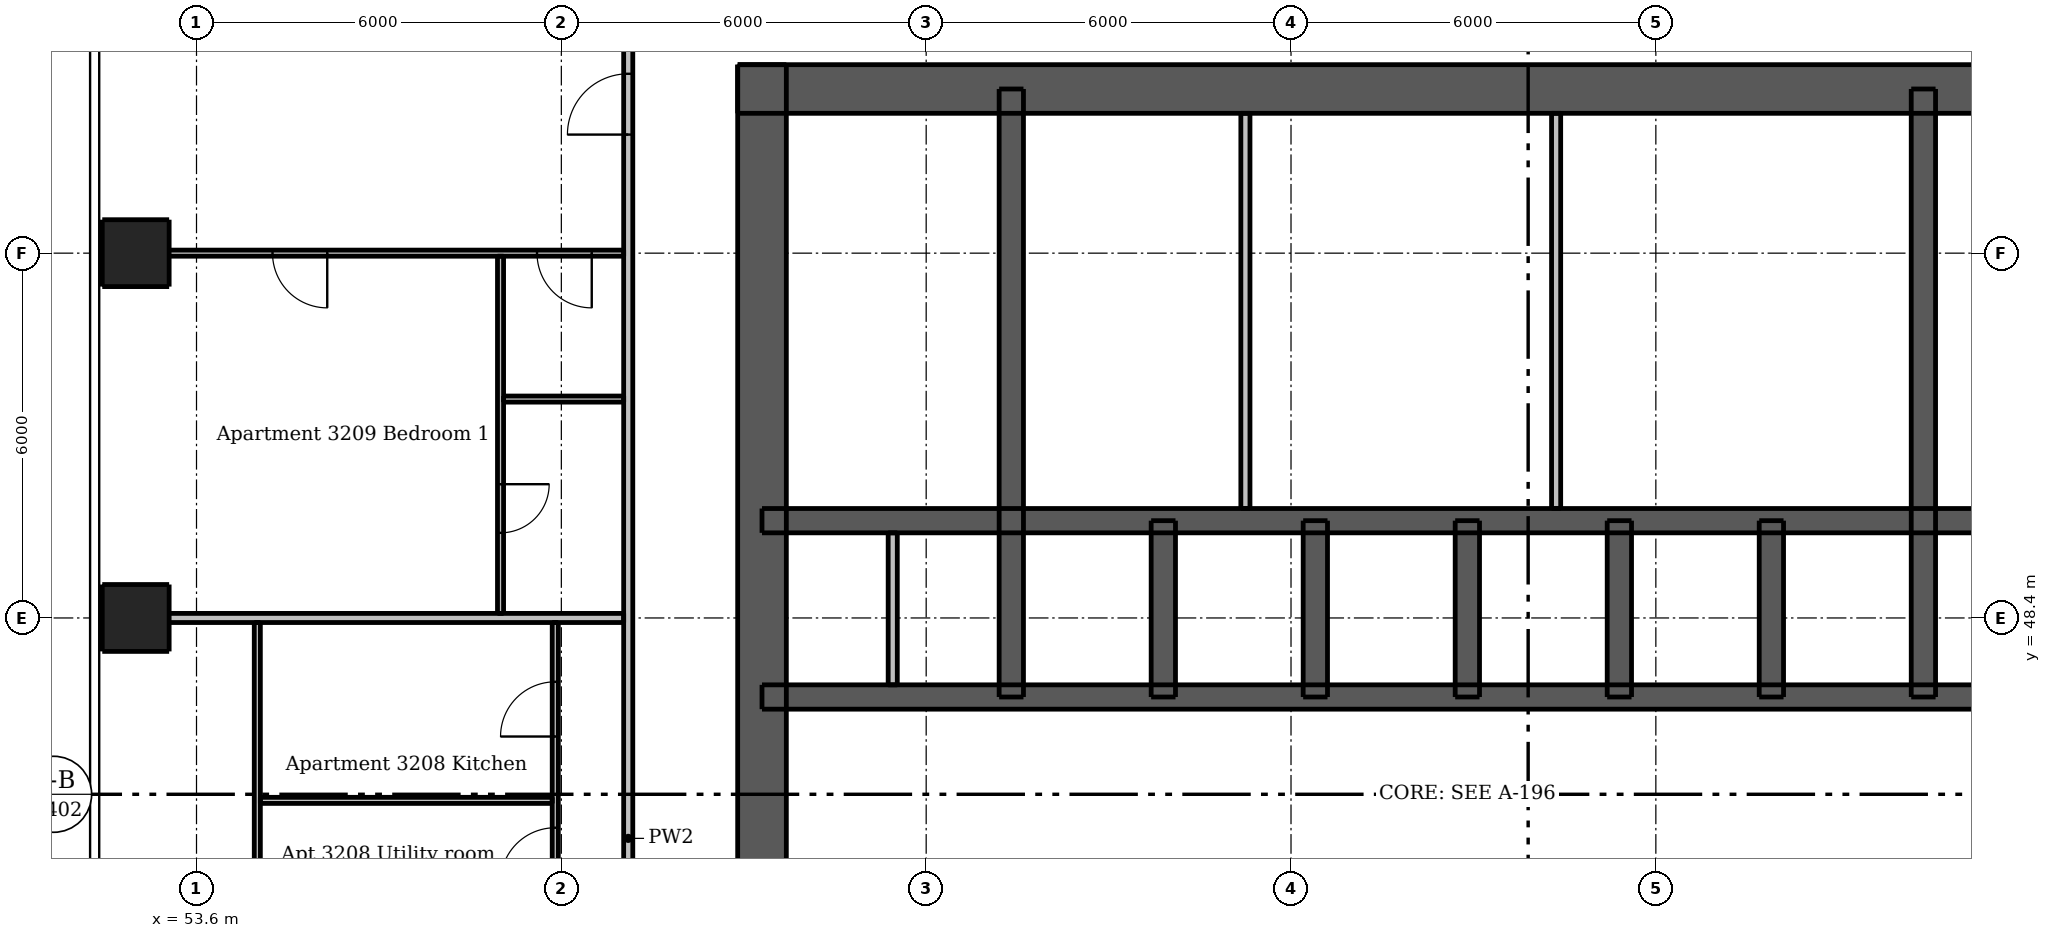
"""IFC4 building model, lengths in metres.
Left out: names, types, materials, properties, quantities, classifications, styles, units other than length and angle.
Written with IfcOpenShell. Run it as: python <this file> out.ifc"""

import sys

from ifc_helpers import new_model, si_unit, direction, frame, frame_2d, origin, origin_2d, place, context, subcontext, project, spatial, rectangle, extrude, element, fill, save


model = new_model("IFC4")
c1 = context("Model", 3, precision=1e-05, world=origin(), true_north=direction((0.0, 1.0)))
c2 = subcontext(c1, "Body", "Model", "MODEL_VIEW")
j1 = project(units=[si_unit("LENGTHUNIT", "METRE"), si_unit("PLANEANGLEUNIT", "RADIAN")], contexts=[c1])
p1 = place(None, origin())
s1 = spatial("IfcSite", under=j1, at=p1, CompositionType="ELEMENT")
p2 = place(p1, origin())
s2 = spatial("IfcBuilding", under=s1, at=p2, CompositionType="ELEMENT")
p3 = place(p2, frame((0.0, 0.0, 118.3)))
s3 = spatial("IfcBuildingStorey", under=s2, at=p3, CompositionType="ELEMENT", Elevation=118.3)
p4 = place(p3, frame((62.5, 57.1, 0.0), z_axis=(0.0, 0.0, 1.0), x_axis=(1.0, 0.0, 0.0)))
e1 = element("IfcWall", 1, at=p4, inside=s3, PredefinedType="SHEAR", context=c2, shape_type="SweptSolid", body=[
    extrude(rectangle(XDim=24.0, YDim=0.8, at=frame_2d((12.0, 0.0))), origin(), (0.0, 0.0, 1.0), 3.05),
])
p5 = place(p4, frame((20.9, 0.0, 0.0)))
e2 = element("IfcOpeningElement", 2, at=p5, cuts=e1, PredefinedType="OPENING", context=c2, shape_type="SweptSolid", body=[
    extrude(rectangle(XDim=1.1, YDim=2.1, at=frame_2d((0.55, 1.05))), frame((0.0, 0.41, 0.0), z_axis=(0.0, -1.0, 0.0), x_axis=(1.0, 0.0, 0.0)), (0.0, 0.0, 1.0), 0.82),
])
p6 = place(p4, frame((2.0, 0.0, 0.0)))
e3 = element("IfcOpeningElement", 3, at=p6, cuts=e1, PredefinedType="OPENING", context=c2, shape_type="SweptSolid", body=[
    extrude(rectangle(XDim=1.1, YDim=2.1, at=frame_2d((0.55, 1.05))), frame((0.0, 0.41, 0.0), z_axis=(0.0, -1.0, 0.0), x_axis=(1.0, 0.0, 0.0)), (0.0, 0.0, 1.0), 0.82),
])
p7 = place(p4, frame((6.075, 0.0, 0.0)))
e4 = element("IfcOpeningElement", 4, at=p7, cuts=e1, PredefinedType="OPENING", context=c2, shape_type="SweptSolid", body=[
    extrude(rectangle(XDim=0.9, YDim=2.1, at=frame_2d((0.45, 1.05))), frame((0.0, 0.41, 0.0), z_axis=(0.0, -1.0, 0.0), x_axis=(1.0, 0.0, 0.0)), (0.0, 0.0, 1.0), 0.82),
])
p8 = place(p4, frame((10.455, 0.0, 0.0)))
e5 = element("IfcOpeningElement", 5, at=p8, cuts=e1, PredefinedType="OPENING", context=c2, shape_type="SweptSolid", body=[
    extrude(rectangle(XDim=0.9, YDim=2.1, at=frame_2d((0.45, 1.05))), frame((0.0, 0.41, 0.0), z_axis=(0.0, -1.0, 0.0), x_axis=(1.0, 0.0, 0.0)), (0.0, 0.0, 1.0), 0.82),
])
p9 = place(p4, frame((15.93, 0.0, 0.0)))
e6 = element("IfcOpeningElement", 6, at=p9, cuts=e1, PredefinedType="OPENING", context=c2, shape_type="SweptSolid", body=[
    extrude(rectangle(XDim=0.9, YDim=2.1, at=frame_2d((0.45, 1.05))), frame((0.0, 0.41, 0.0), z_axis=(0.0, -1.0, 0.0), x_axis=(1.0, 0.0, 0.0)), (0.0, 0.0, 1.0), 0.82),
])
p10 = place(p3, frame((62.9, 33.5, 0.0), z_axis=(0.0, 0.0, 1.0), x_axis=(0.0, 1.0, 0.0)))
e7 = element("IfcWall", 7, at=p10, inside=s3, PredefinedType="SHEAR", context=c2, shape_type="SweptSolid", body=[
    extrude(rectangle(XDim=24.0, YDim=0.8, at=frame_2d((12.0, 0.0))), origin(), (0.0, 0.0, 1.0), 3.05),
])
p11 = place(p10, frame((11.2, 0.0, 0.0)))
e8 = element("IfcOpeningElement", 8, at=p11, cuts=e7, PredefinedType="OPENING", context=c2, shape_type="SweptSolid", body=[
    extrude(rectangle(XDim=1.6, YDim=2.1, at=frame_2d((0.8, 1.05))), frame((0.0, 0.41, 0.0), z_axis=(0.0, -1.0, 0.0), x_axis=(1.0, 0.0, 0.0)), (0.0, 0.0, 1.0), 0.82),
])
p12 = place(p3, frame((62.9, 47.1, 0.0), z_axis=(0.0, 0.0, 1.0), x_axis=(1.0, 0.0, 0.0)))
e9 = element("IfcWall", 9, at=p12, inside=s3, PredefinedType="SHEAR", context=c2, shape_type="SweptSolid", body=[
    extrude(rectangle(XDim=23.2, YDim=0.4, at=frame_2d((11.6, 0.0))), origin(), (0.0, 0.0, 1.0), 3.05),
])
p13 = place(p12, frame((0.825, 0.0, 0.0)))
e10 = element("IfcOpeningElement", 10, at=p13, cuts=e9, PredefinedType="OPENING", context=c2, shape_type="SweptSolid", body=[
    extrude(rectangle(XDim=0.9, YDim=2.1, at=frame_2d((0.45, 1.05))), frame((0.0, 0.21, 0.0), z_axis=(0.0, -1.0, 0.0), x_axis=(1.0, 0.0, 0.0)), (0.0, 0.0, 1.0), 0.42),
])
p14 = place(p12, frame((2.575, 0.0, 0.0)))
e11 = element("IfcOpeningElement", 11, at=p14, cuts=e9, PredefinedType="OPENING", context=c2, shape_type="SweptSolid", body=[
    extrude(rectangle(XDim=0.9, YDim=2.1, at=frame_2d((0.45, 1.05))), frame((0.0, 0.21, 0.0), z_axis=(0.0, -1.0, 0.0), x_axis=(1.0, 0.0, 0.0)), (0.0, 0.0, 1.0), 0.42),
])
p15 = place(p12, frame((20.6, 0.0, 0.0)))
e12 = element("IfcOpeningElement", 12, at=p15, cuts=e9, PredefinedType="OPENING", context=c2, shape_type="SweptSolid", body=[
    extrude(rectangle(XDim=0.9, YDim=2.1, at=frame_2d((0.45, 1.05))), frame((0.0, 0.21, 0.0), z_axis=(0.0, -1.0, 0.0), x_axis=(1.0, 0.0, 0.0)), (0.0, 0.0, 1.0), 0.42),
])
p16 = place(p3, frame((62.9, 50.0, 0.0), z_axis=(0.0, 0.0, 1.0), x_axis=(1.0, 0.0, 0.0)))
e13 = element("IfcWall", 13, at=p16, inside=s3, PredefinedType="SHEAR", context=c2, shape_type="SweptSolid", body=[
    extrude(rectangle(XDim=23.2, YDim=0.4, at=frame_2d((11.6, 0.0))), origin(), (0.0, 0.0, 1.0), 3.05),
])
for number, where, z_axis, x_axis in (
    (14, (67.0, 47.1, 0.0), (0.0, 0.0, 1.0), (0.0, 1.0, 0.0)),
    (15, (82.0, 47.1, 0.0), (0.0, 0.0, 1.0), (0.0, 1.0, 0.0)),
):
    element("IfcWall", number, at=place(p3, frame(where, z_axis=z_axis, x_axis=x_axis)), inside=s3, PredefinedType="SHEAR", context=c2, shape_type="SweptSolid", body=[
        extrude(rectangle(XDim=10.0, YDim=0.4, at=frame_2d((5.0, 0.0))), origin(), (0.0, 0.0, 1.0), 3.05),
    ])
for number, where, z_axis, x_axis in (
    (16, (69.5, 47.1, 0.0), (0.0, 0.0, 1.0), (0.0, 1.0, 0.0)),
    (17, (72.0, 47.1, 0.0), (0.0, 0.0, 1.0), (0.0, 1.0, 0.0)),
    (18, (74.5, 47.1, 0.0), (0.0, 0.0, 1.0), (0.0, 1.0, 0.0)),
    (19, (77.0, 47.1, 0.0), (0.0, 0.0, 1.0), (0.0, 1.0, 0.0)),
    (20, (79.5, 47.1, 0.0), (0.0, 0.0, 1.0), (0.0, 1.0, 0.0)),
):
    element("IfcWall", number, at=place(p3, frame(where, z_axis=z_axis, x_axis=x_axis)), inside=s3, PredefinedType="SHEAR", context=c2, shape_type="SweptSolid", body=[
        extrude(rectangle(XDim=2.9, YDim=0.4, at=frame_2d((1.45, 0.0))), origin(), (0.0, 0.0, 1.0), 3.05),
    ])
for number, where, z_axis, x_axis in (
    (21, (52.6, 48.4, 0.0), (0.0, 0.0, 1.0), (1.0, 0.0, 0.0)),
    (22, (52.6, 54.4, 0.0), (0.0, 0.0, 1.0), (1.0, 0.0, 0.0)),
):
    element("IfcColumn", number, at=place(p3, frame(where, z_axis=z_axis, x_axis=x_axis)), inside=s3, PredefinedType="COLUMN", context=c2, shape_type="SweptSolid", body=[
        extrude(rectangle(XDim=1.1, YDim=1.1, at=origin_2d()), origin(), (0.0, 0.0, 1.0), 3.05),
    ])
p17 = place(p3, frame((65.05, 47.3, 0.0), z_axis=(0.0, 0.0, 1.0), x_axis=(0.0, 1.0, 0.0)))
e23 = element("IfcWall", 23, at=p17, inside=s3, PredefinedType="PLUMBINGWALL", context=c2, shape_type="SweptSolid", body=[
    extrude(rectangle(XDim=2.5, YDim=0.15, at=frame_2d((1.25, 0.0))), origin(), (0.0, 0.0, 1.0), 3.05),
])
for number, where, z_axis, x_axis in (
    (24, (70.85, 50.2, 0.0), (0.0, 0.0, 1.0), (0.0, 1.0, 0.0)),
    (25, (75.96, 50.2, 0.0), (0.0, 0.0, 1.0), (0.0, 1.0, 0.0)),
):
    element("IfcWall", number, at=place(p3, frame(where, z_axis=z_axis, x_axis=x_axis)), inside=s3, PredefinedType="PLUMBINGWALL", context=c2, shape_type="SweptSolid", body=[
        extrude(rectangle(XDim=6.5, YDim=0.15, at=frame_2d((3.25, 0.0))), origin(), (0.0, 0.0, 1.0), 3.05),
    ])
p18 = place(p3, frame((54.6, 43.55, 0.0), z_axis=(0.0, 0.0, 1.0), x_axis=(0.0, 1.0, 0.0)))
e26 = element("IfcWall", 26, at=p18, inside=s3, PredefinedType="PARTITIONING", context=c2, shape_type="SweptSolid", body=[
    extrude(rectangle(XDim=4.775, YDim=0.1, at=frame_2d((2.387, 0.0))), origin(), (0.0, 0.0, 1.0), 3.05),
])
p19 = place(p3, frame((58.6, 54.35, 0.0), z_axis=(0.0, 0.0, 1.0), x_axis=(0.0, -1.0, 0.0)))
e27 = element("IfcWall", 27, at=p19, inside=s3, PredefinedType="PARTITIONING", context=c2, shape_type="SweptSolid", body=[
    extrude(rectangle(XDim=5.875, YDim=0.1, at=frame_2d((2.938, 0.0))), origin(), (0.0, 0.0, 1.0), 3.05),
])
p20 = place(p19, frame((3.75, 0.0, 0.0)))
e28 = element("IfcOpeningElement", 28, at=p20, cuts=e27, PredefinedType="OPENING", context=c2, shape_type="SweptSolid", body=[
    extrude(rectangle(XDim=0.8, YDim=2.1, at=frame_2d((0.4, 1.05))), frame((0.0, 0.06, 0.0), z_axis=(0.0, -1.0, 0.0), x_axis=(1.0, 0.0, 0.0)), (0.0, 0.0, 1.0), 0.12),
])
p21 = place(p3, frame((59.5, 31.65, 0.0), z_axis=(0.0, 0.0, 1.0), x_axis=(0.0, 1.0, 0.0)))
e29 = element("IfcWall", 29, at=p21, inside=s3, PredefinedType="PARTITIONING", context=c2, shape_type="SweptSolid", body=[
    extrude(rectangle(XDim=16.675, YDim=0.1, at=frame_2d((8.337, 0.0))), origin(), (0.0, 0.0, 1.0), 2.51),
])
p22 = place(p21, frame((9.7, 0.0, 0.0)))
e30 = element("IfcOpeningElement", 30, at=p22, cuts=e29, PredefinedType="OPENING", context=c2, shape_type="SweptSolid", body=[
    extrude(rectangle(XDim=0.9, YDim=2.1, at=frame_2d((0.45, 1.05))), frame((0.0, 0.06, 0.0), z_axis=(0.0, -1.0, 0.0), x_axis=(1.0, 0.0, 0.0)), (0.0, 0.0, 1.0), 0.12),
])
p23 = place(p21, frame((14.8, 0.0, 0.0)))
e31 = element("IfcOpeningElement", 31, at=p23, cuts=e29, PredefinedType="OPENING", context=c2, shape_type="SweptSolid", body=[
    extrude(rectangle(XDim=0.9, YDim=2.1, at=frame_2d((0.45, 1.05))), frame((0.0, 0.06, 0.0), z_axis=(0.0, -1.0, 0.0), x_axis=(1.0, 0.0, 0.0)), (0.0, 0.0, 1.0), 0.12),
])
p24 = place(p21, frame((12.4, 0.0, 0.0)))
e32 = element("IfcOpeningElement", 32, at=p24, cuts=e29, PredefinedType="OPENING", context=c2, shape_type="SweptSolid", body=[
    extrude(rectangle(XDim=0.9, YDim=2.1, at=frame_2d((0.45, 1.05))), frame((0.0, 0.06, 0.0), z_axis=(0.0, -1.0, 0.0), x_axis=(1.0, 0.0, 0.0)), (0.0, 0.0, 1.0), 0.12),
])
p25 = place(p21, frame((5.2, 0.0, 0.0)))
e33 = element("IfcOpeningElement", 33, at=p25, cuts=e29, PredefinedType="OPENING", context=c2, shape_type="SweptSolid", body=[
    extrude(rectangle(XDim=0.9, YDim=2.1, at=frame_2d((0.45, 1.05))), frame((0.0, 0.06, 0.0), z_axis=(0.0, -1.0, 0.0), x_axis=(1.0, 0.0, 0.0)), (0.0, 0.0, 1.0), 0.12),
])
p26 = place(p21, frame((7.05, 0.0, 0.0)))
e34 = element("IfcOpeningElement", 34, at=p26, cuts=e29, PredefinedType="OPENING", context=c2, shape_type="SweptSolid", body=[
    extrude(rectangle(XDim=0.8, YDim=2.1, at=frame_2d((0.4, 1.05))), frame((0.0, 0.06, 0.0), z_axis=(0.0, -1.0, 0.0), x_axis=(1.0, 0.0, 0.0)), (0.0, 0.0, 1.0), 0.12),
])
p27 = place(p21, frame((0.75, 0.0, 0.0)))
e35 = element("IfcOpeningElement", 35, at=p27, cuts=e29, PredefinedType="OPENING", context=c2, shape_type="SweptSolid", body=[
    extrude(rectangle(XDim=0.9, YDim=2.1, at=frame_2d((0.45, 1.05))), frame((0.0, 0.06, 0.0), z_axis=(0.0, -1.0, 0.0), x_axis=(1.0, 0.0, 0.0)), (0.0, 0.0, 1.0), 0.12),
])
p28 = place(p21, frame((3.15, 0.0, 0.0)))
e36 = element("IfcOpeningElement", 36, at=p28, cuts=e29, PredefinedType="OPENING", context=c2, shape_type="SweptSolid", body=[
    extrude(rectangle(XDim=0.8, YDim=2.1, at=frame_2d((0.4, 1.05))), frame((0.0, 0.06, 0.0), z_axis=(0.0, -1.0, 0.0), x_axis=(1.0, 0.0, 0.0)), (0.0, 0.0, 1.0), 0.12),
])
p29 = place(p3, frame((60.625, 54.4, 0.0), z_axis=(0.0, 0.0, 1.0), x_axis=(-1.0, 0.0, 0.0)))
e37 = element("IfcWall", 37, at=p29, inside=s3, PredefinedType="PARTITIONING", context=c2, shape_type="SweptSolid", body=[
    extrude(rectangle(XDim=8.625, YDim=0.1, at=frame_2d((4.312, 0.0))), origin(), (0.0, 0.0, 1.0), 2.516),
])
p30 = place(p29, frame((0.525, 0.0, 0.0)))
e38 = element("IfcOpeningElement", 38, at=p30, cuts=e37, PredefinedType="OPENING", context=c2, shape_type="SweptSolid", body=[
    extrude(rectangle(XDim=0.9, YDim=2.1, at=frame_2d((0.45, 1.05))), frame((0.0, 0.06, 0.0), z_axis=(0.0, -1.0, 0.0), x_axis=(1.0, 0.0, 0.0)), (0.0, 0.0, 1.0), 0.12),
])
p31 = place(p29, frame((4.875, 0.0, 0.0)))
e39 = element("IfcOpeningElement", 39, at=p31, cuts=e37, PredefinedType="OPENING", context=c2, shape_type="SweptSolid", body=[
    extrude(rectangle(XDim=0.9, YDim=2.1, at=frame_2d((0.45, 1.05))), frame((0.0, 0.06, 0.0), z_axis=(0.0, -1.0, 0.0), x_axis=(1.0, 0.0, 0.0)), (0.0, 0.0, 1.0), 0.12),
])
p32 = place(p3, frame((58.65, 52.0, 0.0), z_axis=(0.0, 0.0, 1.0), x_axis=(1.0, 0.0, 0.0)))
e40 = element("IfcWall", 40, at=p32, inside=s3, PredefinedType="PARTITIONING", context=c2, shape_type="SweptSolid", body=[
    extrude(rectangle(XDim=1.975, YDim=0.1, at=frame_2d((0.988, 0.0))), origin(), (0.0, 0.0, 1.0), 3.05),
])
p33 = place(p3, frame((54.65, 45.4, 0.0), z_axis=(0.0, 0.0, 1.0), x_axis=(1.0, 0.0, 0.0)))
e41 = element("IfcWall", 41, at=p33, inside=s3, PredefinedType="PARTITIONING", context=c2, shape_type="SweptSolid", body=[
    extrude(rectangle(XDim=4.8, YDim=0.1, at=frame_2d((2.4, 0.0))), origin(), (0.0, 0.0, 1.0), 3.05),
])
p34 = place(p3, frame((60.7, 30.325, 0.0), z_axis=(0.0, 0.0, 1.0), x_axis=(0.0, 1.0, 0.0)))
e42 = element("IfcWall", 42, at=p34, inside=s3, PredefinedType="PARTITIONING", context=c2, shape_type="SweptSolid", body=[
    extrude(rectangle(XDim=28.9, YDim=0.15, at=frame_2d((14.45, 0.0))), origin(), (0.0, 0.0, 1.0), 3.05),
])
p35 = place(p34, frame((9.225, 0.0, 0.0)))
e43 = element("IfcOpeningElement", 43, at=p35, cuts=e42, PredefinedType="OPENING", context=c2, shape_type="SweptSolid", body=[
    extrude(rectangle(XDim=1.0, YDim=2.1, at=frame_2d((0.5, 1.05))), frame((0.0, 0.085, 0.0), z_axis=(0.0, -1.0, 0.0), x_axis=(1.0, 0.0, 0.0)), (0.0, 0.0, 1.0), 0.17),
])
p36 = place(p34, frame((26.025, 0.0, 0.0)))
e44 = element("IfcOpeningElement", 44, at=p36, cuts=e42, PredefinedType="OPENING", context=c2, shape_type="SweptSolid", body=[
    extrude(rectangle(XDim=1.0, YDim=2.1, at=frame_2d((0.5, 1.05))), frame((0.0, 0.085, 0.0), z_axis=(0.0, -1.0, 0.0), x_axis=(1.0, 0.0, 0.0)), (0.0, 0.0, 1.0), 0.17),
])
p37 = place(p3, frame((52.0, 48.4, 0.0), z_axis=(0.0, 0.0, 1.0), x_axis=(1.0, 0.0, 0.0)))
e45 = element("IfcWall", 45, at=p37, inside=s3, PredefinedType="PARTITIONING", context=c2, shape_type="SweptSolid", body=[
    extrude(rectangle(XDim=8.625, YDim=0.15, at=frame_2d((4.312, 0.0))), origin(), (0.0, 0.0, 1.0), 2.516),
])
p38 = place(p6, origin())
e46 = element("IfcDoor", 46, at=p38, inside=s3, OperationType="SINGLE_SWING_LEFT", PredefinedType="DOOR", context=c2, shape_type="SweptSolid", body=[
    extrude(rectangle(XDim=1.1, YDim=2.1, at=frame_2d((0.55, 1.05))), frame((0.0, -0.337, 0.0), z_axis=(0.0, -1.0, 0.0), x_axis=(1.0, 0.0, 0.0)), (0.0, 0.0, 1.0), 0.05),
])
fill(e3, e46)
p39 = place(p11, origin())
e47 = element("IfcDoor", 47, at=p39, inside=s3, OperationType="DOUBLE_DOOR_SINGLE_SWING", PredefinedType="DOOR", context=c2, shape_type="SweptSolid", body=[
    extrude(rectangle(XDim=1.6, YDim=2.1, at=frame_2d((0.8, 1.05))), frame((0.0, -0.337, 0.0), z_axis=(0.0, -1.0, 0.0), x_axis=(1.0, 0.0, 0.0)), (0.0, 0.0, 1.0), 0.05),
])
fill(e8, e47)
p40 = place(p13, origin())
e48 = element("IfcDoor", 48, at=p40, inside=s3, OperationType="SINGLE_SWING_LEFT", PredefinedType="DOOR", context=c2, shape_type="SweptSolid", body=[
    extrude(rectangle(XDim=0.9, YDim=2.1, at=frame_2d((0.45, 1.05))), frame((0.0, 0.188, 0.0), z_axis=(0.0, -1.0, 0.0), x_axis=(1.0, 0.0, 0.0)), (0.0, 0.0, 1.0), 0.05),
])
fill(e10, e48)
p41 = place(p14, origin())
e49 = element("IfcDoor", 49, at=p41, inside=s3, OperationType="SINGLE_SWING_RIGHT", PredefinedType="DOOR", context=c2, shape_type="SweptSolid", body=[
    extrude(rectangle(XDim=0.9, YDim=2.1, at=frame_2d((0.45, 1.05))), frame((0.0, 0.188, 0.0), z_axis=(0.0, -1.0, 0.0), x_axis=(1.0, 0.0, 0.0)), (0.0, 0.0, 1.0), 0.05),
])
fill(e11, e49)
p42 = place(p7, origin())
e50 = element("IfcDoor", 50, at=p42, inside=s3, OperationType="SINGLE_SWING_RIGHT", PredefinedType="DOOR", context=c2, shape_type="SweptSolid", body=[
    extrude(rectangle(XDim=0.9, YDim=2.1, at=frame_2d((0.45, 1.05))), frame((0.0, -0.337, 0.0), z_axis=(0.0, -1.0, 0.0), x_axis=(1.0, 0.0, 0.0)), (0.0, 0.0, 1.0), 0.05),
])
fill(e4, e50)
p43 = place(p8, origin())
e51 = element("IfcDoor", 51, at=p43, inside=s3, OperationType="SINGLE_SWING_RIGHT", PredefinedType="DOOR", context=c2, shape_type="SweptSolid", body=[
    extrude(rectangle(XDim=0.9, YDim=2.1, at=frame_2d((0.45, 1.05))), frame((0.0, -0.337, 0.0), z_axis=(0.0, -1.0, 0.0), x_axis=(1.0, 0.0, 0.0)), (0.0, 0.0, 1.0), 0.05),
])
fill(e5, e51)
p44 = place(p9, origin())
e52 = element("IfcDoor", 52, at=p44, inside=s3, OperationType="SINGLE_SWING_RIGHT", PredefinedType="DOOR", context=c2, shape_type="SweptSolid", body=[
    extrude(rectangle(XDim=0.9, YDim=2.1, at=frame_2d((0.45, 1.05))), frame((0.0, -0.337, 0.0), z_axis=(0.0, -1.0, 0.0), x_axis=(1.0, 0.0, 0.0)), (0.0, 0.0, 1.0), 0.05),
])
fill(e6, e52)
p45 = place(p23, origin())
e53 = element("IfcDoor", 53, at=p45, inside=s3, OperationType="SINGLE_SWING_LEFT", PredefinedType="DOOR", context=c2, shape_type="SweptSolid", body=[
    extrude(rectangle(XDim=0.9, YDim=2.1, at=frame_2d((0.45, 1.05))), frame((0.0, 0.025, 0.0), z_axis=(0.0, -1.0, 0.0), x_axis=(1.0, 0.0, 0.0)), (0.0, 0.0, 1.0), 0.05),
])
fill(e31, e53)
p46 = place(p24, origin())
e54 = element("IfcDoor", 54, at=p46, inside=s3, OperationType="SINGLE_SWING_LEFT", PredefinedType="DOOR", context=c2, shape_type="SweptSolid", body=[
    extrude(rectangle(XDim=0.9, YDim=2.1, at=frame_2d((0.45, 1.05))), frame((0.0, 0.025, 0.0), z_axis=(0.0, -1.0, 0.0), x_axis=(1.0, 0.0, 0.0)), (0.0, 0.0, 1.0), 0.05),
])
fill(e32, e54)
p47 = place(p36, origin())
e55 = element("IfcDoor", 55, at=p47, inside=s3, OperationType="SINGLE_SWING_LEFT", PredefinedType="DOOR", context=c2, shape_type="SweptSolid", body=[
    extrude(rectangle(XDim=1.0, YDim=2.1, at=frame_2d((0.5, 1.05))), frame((0.0, 0.025, 0.0), z_axis=(0.0, -1.0, 0.0), x_axis=(1.0, 0.0, 0.0)), (0.0, 0.0, 1.0), 0.05),
])
fill(e44, e55)
p48 = place(p30, origin())
e56 = element("IfcDoor", 56, at=p48, inside=s3, OperationType="SINGLE_SWING_LEFT", PredefinedType="DOOR", context=c2, shape_type="SweptSolid", body=[
    extrude(rectangle(XDim=0.9, YDim=2.1, at=frame_2d((0.45, 1.05))), frame((0.0, 0.025, 0.0), z_axis=(0.0, -1.0, 0.0), x_axis=(1.0, 0.0, 0.0)), (0.0, 0.0, 1.0), 0.05),
])
fill(e38, e56)
p49 = place(p31, origin())
e57 = element("IfcDoor", 57, at=p49, inside=s3, OperationType="SINGLE_SWING_LEFT", PredefinedType="DOOR", context=c2, shape_type="SweptSolid", body=[
    extrude(rectangle(XDim=0.9, YDim=2.1, at=frame_2d((0.45, 1.05))), frame((0.0, 0.025, 0.0), z_axis=(0.0, -1.0, 0.0), x_axis=(1.0, 0.0, 0.0)), (0.0, 0.0, 1.0), 0.05),
])
fill(e39, e57)
p50 = place(p20, origin())
e58 = element("IfcDoor", 58, at=p50, inside=s3, OperationType="SINGLE_SWING_LEFT", PredefinedType="DOOR", context=c2, shape_type="SweptSolid", body=[
    extrude(rectangle(XDim=0.8, YDim=2.1, at=frame_2d((0.4, 1.05))), frame((0.0, 0.025, 0.0), z_axis=(0.0, -1.0, 0.0), x_axis=(1.0, 0.0, 0.0)), (0.0, 0.0, 1.0), 0.05),
])
fill(e28, e58)
save(model, sys.argv[1])
